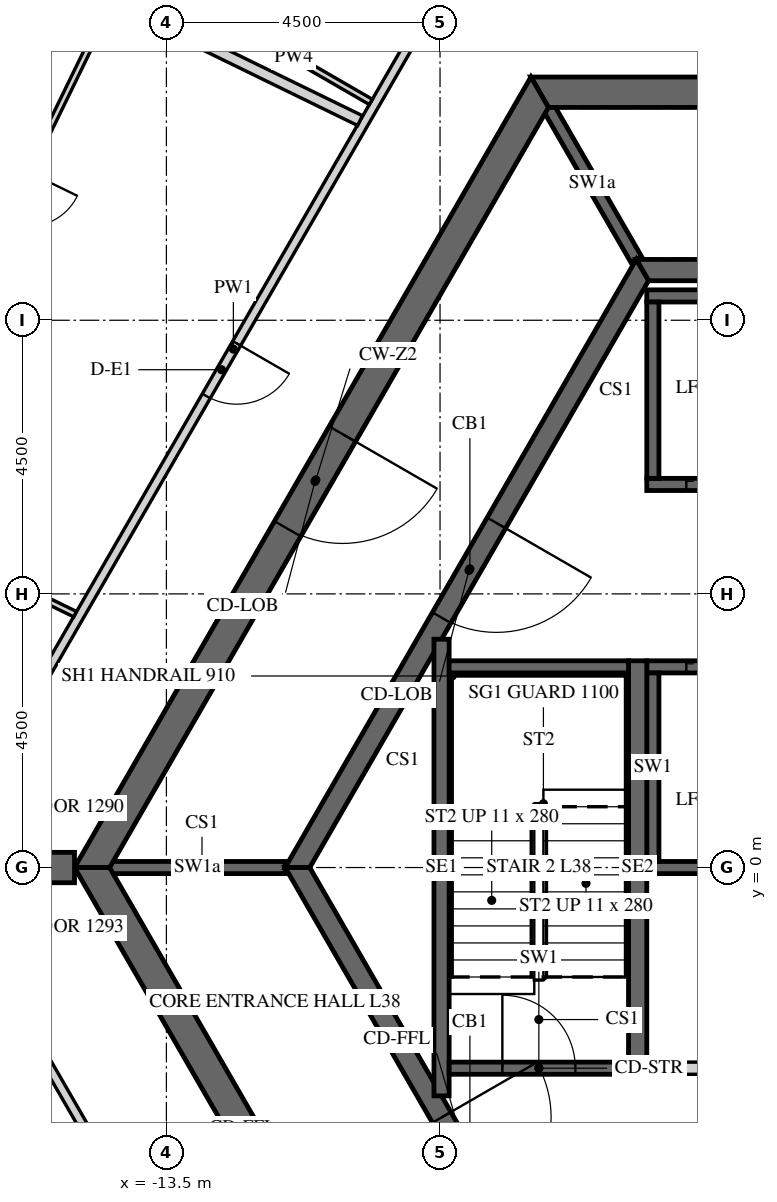
"""IFC4 building model, lengths in metres.
Left out: names, types, materials, properties, quantities, classifications, styles, units other than length and angle.
Written with IfcOpenShell. Run it as: python <this file> out.ifc"""

import sys

from ifc_helpers import new_model, si_unit, direction, frame, frame_2d, origin, place, context, subcontext, project, spatial, polyline, rectangle, outline, extrude, element, fill, save


model = new_model("IFC4")
c1 = context("Model", 3, precision=1e-05, world=origin(), true_north=direction((0.0, 1.0)))
c2 = subcontext(c1, "Body", "Model", "MODEL_VIEW")
j1 = project(units=[si_unit("LENGTHUNIT", "METRE"), si_unit("PLANEANGLEUNIT", "RADIAN")], contexts=[c1])
p1 = place(None, origin())
s1 = spatial("IfcSite", under=j1, at=p1, CompositionType="ELEMENT")
p2 = place(p1, origin())
s2 = spatial("IfcBuilding", under=s1, at=p2, CompositionType="ELEMENT")
p3 = place(p2, frame((0.0, 0.0, 164.4)))
s3 = spatial("IfcBuildingStorey", under=s2, at=p3, CompositionType="ELEMENT", Elevation=164.4)
p4 = place(p3, frame((-7.361, 12.75, -0.15), z_axis=(0.0, 0.0, 1.0), x_axis=(-0.50000571537, -0.866022103989, 0.0)))
e1 = element("IfcWall", 1, at=p4, inside=s3, PredefinedType="SHEAR", context=c2, shape_type="SweptSolid", body=[
    extrude(outline(polyline([(-0.144, -0.25), (14.867, -0.25), (14.578, 0.25), (0.144, 0.25), (-0.144, -0.25)])), origin(), (0.0, 0.0, 1.0), 3.9),
])
p5 = place(p4, frame((6.49, 0.0, 0.15)))
e2 = element("IfcOpeningElement", 2, at=p5, cuts=e1, PredefinedType="OPENING", context=c2, shape_type="SweptSolid", body=[
    extrude(rectangle(XDim=1.8, YDim=2.4, at=frame_2d((0.9, 1.2))), frame((0.0, 0.26, 0.0), z_axis=(0.0, -1.0, 0.0), x_axis=(1.0, 0.0, 0.0)), (0.0, 0.0, 1.0), 0.52),
])
p6 = place(p3, frame((-14.722, 0.0, -0.15), z_axis=(0.0, 0.0, 1.0), x_axis=(0.50000571537, -0.866022103989, 0.0)))
e3 = element("IfcWall", 3, at=p6, inside=s3, PredefinedType="SHEAR", context=c2, shape_type="SweptSolid", body=[
    extrude(outline(polyline([(-0.144, -0.25), (14.867, -0.25), (14.578, 0.25), (0.144, 0.25), (-0.144, -0.25)])), origin(), (0.0, 0.0, 1.0), 3.9),
])
p7 = place(p6, frame((6.432, 0.0, 0.15)))
e4 = element("IfcOpeningElement", 4, at=p7, cuts=e3, PredefinedType="OPENING", context=c2, shape_type="SweptSolid", body=[
    extrude(rectangle(XDim=1.8, YDim=2.4, at=frame_2d((0.9, 1.2))), frame((0.0, 0.26, 0.0), z_axis=(0.0, -1.0, 0.0), x_axis=(1.0, 0.0, 0.0)), (0.0, 0.0, 1.0), 0.52),
])
p8 = place(p3, frame((7.361, 12.75, -0.15), z_axis=(0.0, 0.0, 1.0), x_axis=(-1.0, 0.0, 0.0)))
e5 = element("IfcWall", 5, at=p8, inside=s3, PredefinedType="SHEAR", context=c2, shape_type="SweptSolid", body=[
    extrude(outline(polyline([(-0.144, -0.25), (14.866, -0.25), (14.578, 0.25), (0.144, 0.25), (-0.144, -0.25)])), origin(), (0.0, 0.0, 1.0), 3.9),
])
p9 = place(p8, frame((6.761, 0.0, 0.15)))
e6 = element("IfcOpeningElement", 6, at=p9, cuts=e5, PredefinedType="OPENING", context=c2, shape_type="SweptSolid", body=[
    extrude(rectangle(XDim=1.2, YDim=2.4, at=frame_2d((0.6, 1.2))), frame((0.0, 0.26, 0.0), z_axis=(0.0, -1.0, 0.0), x_axis=(1.0, 0.0, 0.0)), (0.0, 0.0, 1.0), 0.52),
])
p10 = place(p3, frame((-15.011, 0.0, -0.15), z_axis=(0.0, 0.0, 1.0), x_axis=(-1.0, 0.0, 0.0)))
e7 = element("IfcWall", 7, at=p10, inside=s3, PredefinedType="SHEAR", context=c2, shape_type="SweptSolid", body=[
    extrude(rectangle(XDim=15.424, YDim=0.5, at=frame_2d((7.712, 0.0))), origin(), (0.0, 0.0, 1.0), 3.9),
])
p11 = place(p10, frame((6.812, 0.0, 0.15)))
e8 = element("IfcOpeningElement", 8, at=p11, cuts=e7, PredefinedType="OPENING", context=c2, shape_type="SweptSolid", body=[
    extrude(rectangle(XDim=1.8, YDim=2.4, at=frame_2d((0.9, 1.2))), frame((0.0, 0.26, 0.0), z_axis=(0.0, -1.0, 0.0), x_axis=(1.0, 0.0, 0.0)), (0.0, 0.0, 1.0), 0.52),
])
p12 = place(p3, frame((-5.673, 9.825, -0.15), z_axis=(0.0, 0.0, 1.0), x_axis=(-0.499995046907, -0.866028263435, 0.0)))
e9 = element("IfcWall", 9, at=p12, inside=s3, PredefinedType="SHEAR", context=c2, shape_type="SweptSolid", body=[
    extrude(outline(polyline([(-0.101, -0.175), (11.446, -0.175), (11.244, 0.175), (0.101, 0.175), (-0.101, -0.175)])), origin(), (0.0, 0.0, 1.0), 3.9),
])
p13 = place(p12, frame((4.801, 0.0, 0.15)))
e10 = element("IfcOpeningElement", 10, at=p13, cuts=e9, PredefinedType="OPENING", context=c2, shape_type="SweptSolid", body=[
    extrude(rectangle(XDim=1.8, YDim=2.4, at=frame_2d((0.9, 1.2))), frame((0.0, 0.185, 0.0), z_axis=(0.0, -1.0, 0.0), x_axis=(1.0, 0.0, 0.0)), (0.0, 0.0, 1.0), 0.37),
])
p14 = place(p3, frame((-11.345, 0.0, -0.15), z_axis=(0.0, 0.0, 1.0), x_axis=(0.499995046907, -0.866028263435, 0.0)))
e11 = element("IfcWall", 11, at=p14, inside=s3, PredefinedType="SHEAR", context=c2, shape_type="SweptSolid", body=[
    extrude(outline(polyline([(-0.101, -0.175), (11.446, -0.175), (11.244, 0.175), (0.101, 0.175), (-0.101, -0.175)])), origin(), (0.0, 0.0, 1.0), 3.9),
])
p15 = place(p14, frame((4.744, 0.0, 0.15)))
e12 = element("IfcOpeningElement", 12, at=p15, cuts=e11, PredefinedType="OPENING", context=c2, shape_type="SweptSolid", body=[
    extrude(rectangle(XDim=1.8, YDim=2.4, at=frame_2d((0.9, 1.2))), frame((0.0, 0.185, 0.0), z_axis=(0.0, -1.0, 0.0), x_axis=(1.0, 0.0, 0.0)), (0.0, 0.0, 1.0), 0.37),
])
p16 = place(p3, frame((5.673, 9.825, -0.15), z_axis=(0.0, 0.0, 1.0), x_axis=(-1.0, 0.0, 0.0)))
e13 = element("IfcWall", 13, at=p16, inside=s3, PredefinedType="SHEAR", context=c2, shape_type="SweptSolid", body=[
    extrude(outline(polyline([(-0.101, -0.175), (11.446, -0.175), (11.244, 0.175), (0.101, 0.175), (-0.101, -0.175)])), origin(), (0.0, 0.0, 1.0), 3.9),
])
p17 = place(p3, frame((-5.6, 6.3, -0.25), z_axis=(0.0, 0.0, 1.0), x_axis=(1.0, 0.0, 0.0)))
e14 = element("IfcWall", 14, at=p17, inside=s3, PredefinedType="SHEAR", context=c2, shape_type="SweptSolid", body=[
    extrude(rectangle(XDim=11.2, YDim=0.2, at=frame_2d((5.6, 0.0))), origin(), (0.0, 0.0, 1.0), 3.9),
])
p18 = place(p17, frame((8.45, 0.0, 0.25)))
e15 = element("IfcOpeningElement", 15, at=p18, cuts=e14, PredefinedType="OPENING", context=c2, shape_type="SweptSolid", body=[
    extrude(rectangle(XDim=0.9, YDim=2.1, at=frame_2d((0.45, 1.05))), frame((0.0, 0.11, 0.0), z_axis=(0.0, -1.0, 0.0), x_axis=(1.0, 0.0, 0.0)), (0.0, 0.0, 1.0), 0.22),
])
p19 = place(p17, frame((0.65, 0.0, 0.25)))
e16 = element("IfcOpeningElement", 16, at=p19, cuts=e14, PredefinedType="OPENING", context=c2, shape_type="SweptSolid", body=[
    extrude(rectangle(XDim=1.1, YDim=2.1, at=frame_2d((0.55, 1.05))), frame((0.0, 0.11, 0.0), z_axis=(0.0, -1.0, 0.0), x_axis=(1.0, 0.0, 0.0)), (0.0, 0.0, 1.0), 0.22),
])
p20 = place(p17, frame((2.85, 0.0, 0.25)))
e17 = element("IfcOpeningElement", 17, at=p20, cuts=e14, PredefinedType="OPENING", context=c2, shape_type="SweptSolid", body=[
    extrude(rectangle(XDim=1.1, YDim=2.1, at=frame_2d((0.55, 1.05))), frame((0.0, 0.11, 0.0), z_axis=(0.0, -1.0, 0.0), x_axis=(1.0, 0.0, 0.0)), (0.0, 0.0, 1.0), 0.22),
])
p21 = place(p17, frame((5.05, 0.0, 0.25)))
e18 = element("IfcOpeningElement", 18, at=p21, cuts=e14, PredefinedType="OPENING", context=c2, shape_type="SweptSolid", body=[
    extrude(rectangle(XDim=1.1, YDim=2.1, at=frame_2d((0.55, 1.05))), frame((0.0, 0.11, 0.0), z_axis=(0.0, -1.0, 0.0), x_axis=(1.0, 0.0, 0.0)), (0.0, 0.0, 1.0), 0.22),
])
p22 = place(p3, frame((-5.6, 9.4, -0.25), z_axis=(0.0, 0.0, 1.0), x_axis=(1.0, 0.0, 0.0)))
e19 = element("IfcWall", 19, at=p22, inside=s3, PredefinedType="SHEAR", context=c2, shape_type="SweptSolid", body=[
    extrude(rectangle(XDim=11.2, YDim=0.2, at=frame_2d((5.6, 0.0))), origin(), (0.0, 0.0, 1.0), 3.9),
])
p23 = place(p3, frame((-5.5, 6.4, -0.25), z_axis=(0.0, 0.0, 1.0), x_axis=(0.0, 1.0, 0.0)))
e20 = element("IfcWall", 20, at=p23, inside=s3, PredefinedType="SHEAR", context=c2, shape_type="SweptSolid", body=[
    extrude(rectangle(XDim=2.9, YDim=0.2, at=frame_2d((1.45, 0.0))), origin(), (0.0, 0.0, 1.0), 3.9),
])
p24 = place(p3, frame((-5.6, 3.3, -0.25), z_axis=(0.0, 0.0, 1.0), x_axis=(1.0, 0.0, 0.0)))
e21 = element("IfcWall", 21, at=p24, inside=s3, PredefinedType="SHEAR", context=c2, shape_type="SweptSolid", body=[
    extrude(rectangle(XDim=11.2, YDim=0.2, at=frame_2d((5.6, 0.0))), origin(), (0.0, 0.0, 1.0), 3.9),
])
p25 = place(p24, frame((0.65, 0.0, 0.25)))
e22 = element("IfcOpeningElement", 22, at=p25, cuts=e21, PredefinedType="OPENING", context=c2, shape_type="SweptSolid", body=[
    extrude(rectangle(XDim=1.1, YDim=2.1, at=frame_2d((0.55, 1.05))), frame((0.0, 0.11, 0.0), z_axis=(0.0, -1.0, 0.0), x_axis=(1.0, 0.0, 0.0)), (0.0, 0.0, 1.0), 0.22),
])
p26 = place(p24, frame((2.85, 0.0, 0.25)))
e23 = element("IfcOpeningElement", 23, at=p26, cuts=e21, PredefinedType="OPENING", context=c2, shape_type="SweptSolid", body=[
    extrude(rectangle(XDim=1.1, YDim=2.1, at=frame_2d((0.55, 1.05))), frame((0.0, 0.11, 0.0), z_axis=(0.0, -1.0, 0.0), x_axis=(1.0, 0.0, 0.0)), (0.0, 0.0, 1.0), 0.22),
])
p27 = place(p24, frame((5.05, 0.0, 0.25)))
e24 = element("IfcOpeningElement", 24, at=p27, cuts=e21, PredefinedType="OPENING", context=c2, shape_type="SweptSolid", body=[
    extrude(rectangle(XDim=1.1, YDim=2.1, at=frame_2d((0.55, 1.05))), frame((0.0, 0.11, 0.0), z_axis=(0.0, -1.0, 0.0), x_axis=(1.0, 0.0, 0.0)), (0.0, 0.0, 1.0), 0.22),
])
p28 = place(p24, frame((7.25, 0.0, 0.25)))
e25 = element("IfcOpeningElement", 25, at=p28, cuts=e21, PredefinedType="OPENING", context=c2, shape_type="SweptSolid", body=[
    extrude(rectangle(XDim=1.1, YDim=2.1, at=frame_2d((0.55, 1.05))), frame((0.0, 0.11, 0.0), z_axis=(0.0, -1.0, 0.0), x_axis=(1.0, 0.0, 0.0)), (0.0, 0.0, 1.0), 0.22),
])
p29 = place(p24, frame((9.45, 0.0, 0.25)))
e26 = element("IfcOpeningElement", 26, at=p29, cuts=e21, PredefinedType="OPENING", context=c2, shape_type="SweptSolid", body=[
    extrude(rectangle(XDim=1.1, YDim=2.1, at=frame_2d((0.55, 1.05))), frame((0.0, 0.11, 0.0), z_axis=(0.0, -1.0, 0.0), x_axis=(1.0, 0.0, 0.0)), (0.0, 0.0, 1.0), 0.22),
])
p30 = place(p3, frame((-5.6, 0.0, -0.25), z_axis=(0.0, 0.0, 1.0), x_axis=(1.0, 0.0, 0.0)))
e27 = element("IfcWall", 27, at=p30, inside=s3, PredefinedType="SHEAR", context=c2, shape_type="SweptSolid", body=[
    extrude(rectangle(XDim=11.2, YDim=0.2, at=frame_2d((5.6, 0.0))), origin(), (0.0, 0.0, 1.0), 3.9),
])
p31 = place(p3, frame((-5.5, 0.1, -0.25), z_axis=(0.0, 0.0, 1.0), x_axis=(0.0, 1.0, 0.0)))
e28 = element("IfcWall", 28, at=p31, inside=s3, PredefinedType="SHEAR", context=c2, shape_type="SweptSolid", body=[
    extrude(rectangle(XDim=3.1, YDim=0.2, at=frame_2d((1.55, 0.0))), origin(), (0.0, 0.0, 1.0), 3.9),
])
p32 = place(p3, frame((-5.6, -3.3, 0.0), z_axis=(0.0, 0.0, 1.0), x_axis=(1.0, 0.0, 0.0)))
e29 = element("IfcWall", 29, at=p32, inside=s3, PredefinedType="PARTITIONING", context=c2, shape_type="SweptSolid", body=[
    extrude(rectangle(XDim=5.5, YDim=0.2, at=frame_2d((2.75, 0.0))), origin(), (0.0, 0.0, 1.0), 3.65),
])
p33 = place(p32, frame((2.3, 0.0, 0.0)))
e30 = element("IfcOpeningElement", 30, at=p33, cuts=e29, PredefinedType="OPENING", context=c2, shape_type="SweptSolid", body=[
    extrude(rectangle(XDim=0.9, YDim=2.1, at=frame_2d((0.45, 1.05))), frame((0.0, 0.11, 0.0), z_axis=(0.0, -1.0, 0.0), x_axis=(1.0, 0.0, 0.0)), (0.0, 0.0, 1.0), 0.22),
])
for number, where, z_axis, x_axis in (
    (31, (-5.773, 10.0, -0.15), (0.0, 0.0, 1.0), (-0.5, 0.866, 0.0)),
    (32, (-11.547, 0.0, -0.15), (0.0, 0.0, 1.0), (-1.0, 0.0, 0.0)),
):
    element("IfcWall", number, at=place(p3, frame(where, z_axis=z_axis, x_axis=x_axis)), inside=s3, PredefinedType="SHEAR", context=c2, shape_type="SweptSolid", body=[
        extrude(rectangle(XDim=2.887, YDim=0.2, at=frame_2d((1.443, 0.0))), origin(), (0.0, 0.0, 1.0), 3.9),
    ])
p34 = place(p3, frame((-5.75, -3.4, -0.25), z_axis=(0.0, 0.0, 1.0), x_axis=(0.0, 1.0, 0.0)))
e33 = element("IfcWall", 33, at=p34, inside=s3, PredefinedType="SHEAR", context=c2, shape_type="SweptSolid", body=[
    extrude(rectangle(XDim=6.8, YDim=0.3, at=frame_2d((3.4, 0.0))), origin(), (0.0, 0.0, 1.0), 3.9),
])
p35 = place(p3, frame((-8.975, -3.755, -0.25), z_axis=(0.0, 0.0, 1.0), x_axis=(0.0, 1.0, 0.0)))
e34 = element("IfcWall", 34, at=p35, inside=s3, PredefinedType="SHEAR", context=c2, shape_type="SweptSolid", body=[
    extrude(rectangle(XDim=7.51, YDim=0.25, at=frame_2d((3.755, 0.0))), origin(), (0.0, 0.0, 1.0), 3.9),
])
p36 = place(p3, frame((-8.85, 3.3, -0.25), z_axis=(0.0, 0.0, 1.0), x_axis=(1.0, 0.0, 0.0)))
e35 = element("IfcWall", 35, at=p36, inside=s3, PredefinedType="SHEAR", context=c2, shape_type="SweptSolid", body=[
    extrude(rectangle(XDim=2.95, YDim=0.2, at=frame_2d((1.475, 0.0))), origin(), (0.0, 0.0, 1.0), 3.9),
])
p37 = place(p3, frame((-8.85, -3.3, -0.25), z_axis=(0.0, 0.0, 1.0), x_axis=(1.0, 0.0, 0.0)))
e36 = element("IfcWall", 36, at=p37, inside=s3, PredefinedType="SHEAR", context=c2, shape_type="SweptSolid", body=[
    extrude(rectangle(XDim=2.95, YDim=0.2, at=frame_2d((1.475, 0.0))), origin(), (0.0, 0.0, 1.0), 3.9),
])
p38 = place(p37, frame((0.875, 0.0, 0.25)))
e37 = element("IfcOpeningElement", 37, at=p38, cuts=e36, PredefinedType="OPENING", context=c2, shape_type="SweptSolid", body=[
    extrude(rectangle(XDim=1.2, YDim=2.4, at=frame_2d((0.6, 1.2))), frame((0.0, 0.11, 0.0), z_axis=(0.0, -1.0, 0.0), x_axis=(1.0, 0.0, 0.0)), (0.0, 0.0, 1.0), 0.22),
])
p39 = place(p3, frame((-8.704, 14.925, 0.0), z_axis=(0.0, 0.0, 1.0), x_axis=(-0.499988884089, -0.866031821464, 0.0)))
e38 = element("IfcWall", 38, at=p39, inside=s3, PredefinedType="PARTITIONING", context=c2, shape_type="SweptSolid", body=[
    extrude(rectangle(XDim=14.78, YDim=0.15, at=frame_2d((7.39, 0.0))), origin(), (0.0, 0.0, 1.0), 2.988),
])
p40 = place(p39, frame((7.281, 0.0, 0.0)))
e39 = element("IfcOpeningElement", 39, at=p40, cuts=e38, PredefinedType="OPENING", context=c2, shape_type="SweptSolid", body=[
    extrude(rectangle(XDim=1.0, YDim=2.1, at=frame_2d((0.5, 1.05))), frame((0.0, 0.085, 0.0), z_axis=(0.0, -1.0, 0.0), x_axis=(1.0, 0.0, 0.0)), (0.0, 0.0, 1.0), 0.17),
])
p41 = place(p3, frame((-16.094, -2.125, 0.0), z_axis=(0.0, 0.0, 1.0), x_axis=(0.500010545262, -0.866019315389, 0.0)))
e40 = element("IfcWall", 40, at=p41, inside=s3, PredefinedType="PARTITIONING", context=c2, shape_type="SweptSolid", body=[
    extrude(rectangle(XDim=14.867, YDim=0.15, at=frame_2d((7.434, 0.0))), origin(), (0.0, 0.0, 1.0), 2.988),
])
p42 = place(p41, frame((3.619, 0.0, 0.0)))
e41 = element("IfcOpeningElement", 41, at=p42, cuts=e40, PredefinedType="OPENING", context=c2, shape_type="SweptSolid", body=[
    extrude(rectangle(XDim=1.0, YDim=2.1, at=frame_2d((0.5, 1.05))), frame((0.0, 0.085, 0.0), z_axis=(0.0, -1.0, 0.0), x_axis=(1.0, 0.0, 0.0)), (0.0, 0.0, 1.0), 0.17),
])
p43 = place(p41, frame((9.924, 0.0, 0.0)))
e42 = element("IfcOpeningElement", 42, at=p43, cuts=e40, PredefinedType="OPENING", context=c2, shape_type="SweptSolid", body=[
    extrude(rectangle(XDim=1.0, YDim=2.1, at=frame_2d((0.5, 1.05))), frame((0.0, 0.085, 0.0), z_axis=(0.0, -1.0, 0.0), x_axis=(1.0, 0.0, 0.0)), (0.0, 0.0, 1.0), 0.17),
])
p44 = place(p41, frame((13.717, 0.0, 0.0)))
e43 = element("IfcOpeningElement", 43, at=p44, cuts=e40, PredefinedType="OPENING", context=c2, shape_type="SweptSolid", body=[
    extrude(rectangle(XDim=1.0, YDim=2.1, at=frame_2d((0.5, 1.05))), frame((0.0, 0.085, 0.0), z_axis=(0.0, -1.0, 0.0), x_axis=(1.0, 0.0, 0.0)), (0.0, 0.0, 1.0), 0.17),
])
p45 = place(p3, frame((-10.138, 12.591, 0.0), z_axis=(0.0, 0.0, 1.0), x_axis=(-0.866025730634, 0.499999433879, 0.0)))
e44 = element("IfcWall", 44, at=p45, inside=s3, PredefinedType="PARTITIONING", context=c2, shape_type="SweptSolid", body=[
    extrude(rectangle(XDim=2.925, YDim=0.1, at=frame_2d((1.462, 0.0))), origin(), (0.0, 0.0, 1.0), 2.988),
])
p46 = place(p3, frame((-21.815, 17.892, 0.0), z_axis=(0.0, 0.0, 1.0), x_axis=(0.898799253997, -0.438360469265, 0.0)))
e45 = element("IfcWall", 45, at=p46, inside=s3, PredefinedType="PARTITIONING", context=c2, shape_type="SweptSolid", body=[
    extrude(rectangle(XDim=12.794, YDim=0.18, at=frame_2d((6.397, 0.0))), origin(), (0.0, 0.0, 1.0), 2.988),
])
p47 = place(p3, frame((-17.412, 5.342, 0.0), z_axis=(0.0, 0.0, 1.0), x_axis=(0.898825304183, -0.43830705283, 0.0)))
e46 = element("IfcWall", 46, at=p47, inside=s3, PredefinedType="PARTITIONING", context=c2, shape_type="SweptSolid", body=[
    extrude(rectangle(XDim=2.682, YDim=0.1, at=frame_2d((1.341, 0.0))), origin(), (0.0, 0.0, 1.0), 2.988),
])
p48 = place(p47, frame((1.1, 0.0, 0.0)))
e47 = element("IfcOpeningElement", 47, at=p48, cuts=e46, PredefinedType="OPENING", context=c2, shape_type="SweptSolid", body=[
    extrude(rectangle(XDim=0.8, YDim=2.1, at=frame_2d((0.4, 1.05))), frame((0.0, 0.06, 0.0), z_axis=(0.0, -1.0, 0.0), x_axis=(1.0, 0.0, 0.0)), (0.0, 0.0, 1.0), 0.12),
])
p49 = place(p3, frame((-14.431, 14.19, 0.0), z_axis=(0.0, 0.0, 1.0), x_axis=(-0.438387776054, -0.898785935475, 0.0)))
e48 = element("IfcWall", 48, at=p49, inside=s3, PredefinedType="PARTITIONING", context=c2, shape_type="SweptSolid", body=[
    extrude(rectangle(XDim=7.11, YDim=0.1, at=frame_2d((3.555, 0.0))), origin(), (0.0, 0.0, 1.0), 2.988),
])
p50 = place(p49, frame((3.06, 0.0, 0.0)))
e49 = element("IfcOpeningElement", 49, at=p50, cuts=e48, PredefinedType="OPENING", context=c2, shape_type="SweptSolid", body=[
    extrude(rectangle(XDim=0.9, YDim=2.1, at=frame_2d((0.45, 1.05))), frame((0.0, 0.06, 0.0), z_axis=(0.0, -1.0, 0.0), x_axis=(1.0, 0.0, 0.0)), (0.0, 0.0, 1.0), 0.12),
])
p51 = place(p5, origin())
e50 = element("IfcDoor", 50, at=p51, inside=s3, OperationType="DOUBLE_DOOR_SINGLE_SWING", PredefinedType="DOOR", context=c2, shape_type="SweptSolid", body=[
    extrude(rectangle(XDim=1.8, YDim=2.4, at=frame_2d((0.9, 1.2))), frame((0.0, 0.025, 0.0), z_axis=(0.0, -1.0, 0.0), x_axis=(1.0, 0.0, 0.0)), (0.0, 0.0, 1.0), 0.05),
])
fill(e2, e50)
p52 = place(p13, origin())
e51 = element("IfcDoor", 51, at=p52, inside=s3, OperationType="DOUBLE_DOOR_SINGLE_SWING", PredefinedType="DOOR", context=c2, shape_type="SweptSolid", body=[
    extrude(rectangle(XDim=1.8, YDim=2.4, at=frame_2d((0.9, 1.2))), frame((0.0, 0.025, 0.0), z_axis=(0.0, -1.0, 0.0), x_axis=(1.0, 0.0, 0.0)), (0.0, 0.0, 1.0), 0.05),
])
fill(e10, e51)
p53 = place(p15, origin())
e52 = element("IfcDoor", 52, at=p53, inside=s3, OperationType="DOUBLE_DOOR_SINGLE_SWING", PredefinedType="DOOR", context=c2, shape_type="SweptSolid", body=[
    extrude(rectangle(XDim=1.8, YDim=2.4, at=frame_2d((0.9, 1.2))), frame((0.0, 0.025, 0.0), z_axis=(0.0, -1.0, 0.0), x_axis=(1.0, 0.0, 0.0)), (0.0, 0.0, 1.0), 0.05),
])
fill(e12, e52)
p54 = place(p38, origin())
e53 = element("IfcDoor", 53, at=p54, inside=s3, OperationType="SINGLE_SWING_LEFT", PredefinedType="DOOR", context=c2, shape_type="SweptSolid", body=[
    extrude(rectangle(XDim=1.2, YDim=2.4, at=frame_2d((0.6, 1.2))), frame((0.0, 0.025, 0.0), z_axis=(0.0, -1.0, 0.0), x_axis=(1.0, 0.0, 0.0)), (0.0, 0.0, 1.0), 0.05),
])
fill(e37, e53)
p55 = place(p19, origin())
e54 = element("IfcDoor", 54, at=p55, inside=s3, OperationType="SLIDING_TO_LEFT", PredefinedType="DOOR", context=c2, shape_type="SweptSolid", body=[
    extrude(rectangle(XDim=1.1, YDim=2.1, at=frame_2d((0.55, 1.05))), frame((0.0, 0.025, 0.0), z_axis=(0.0, -1.0, 0.0), x_axis=(1.0, 0.0, 0.0)), (0.0, 0.0, 1.0), 0.05),
])
fill(e16, e54)
p56 = place(p25, origin())
e55 = element("IfcDoor", 55, at=p56, inside=s3, OperationType="SLIDING_TO_LEFT", PredefinedType="DOOR", context=c2, shape_type="SweptSolid", body=[
    extrude(rectangle(XDim=1.1, YDim=2.1, at=frame_2d((0.55, 1.05))), frame((0.0, 0.025, 0.0), z_axis=(0.0, -1.0, 0.0), x_axis=(1.0, 0.0, 0.0)), (0.0, 0.0, 1.0), 0.05),
])
fill(e22, e55)
p57 = place(p40, origin())
e56 = element("IfcDoor", 56, at=p57, inside=s3, OperationType="SINGLE_SWING_RIGHT", PredefinedType="DOOR", context=c2, shape_type="SweptSolid", body=[
    extrude(rectangle(XDim=1.0, YDim=2.1, at=frame_2d((0.5, 1.05))), frame((0.0, 0.025, 0.0), z_axis=(0.0, -1.0, 0.0), x_axis=(1.0, 0.0, 0.0)), (0.0, 0.0, 1.0), 0.05),
])
fill(e39, e56)
save(model, sys.argv[1])
